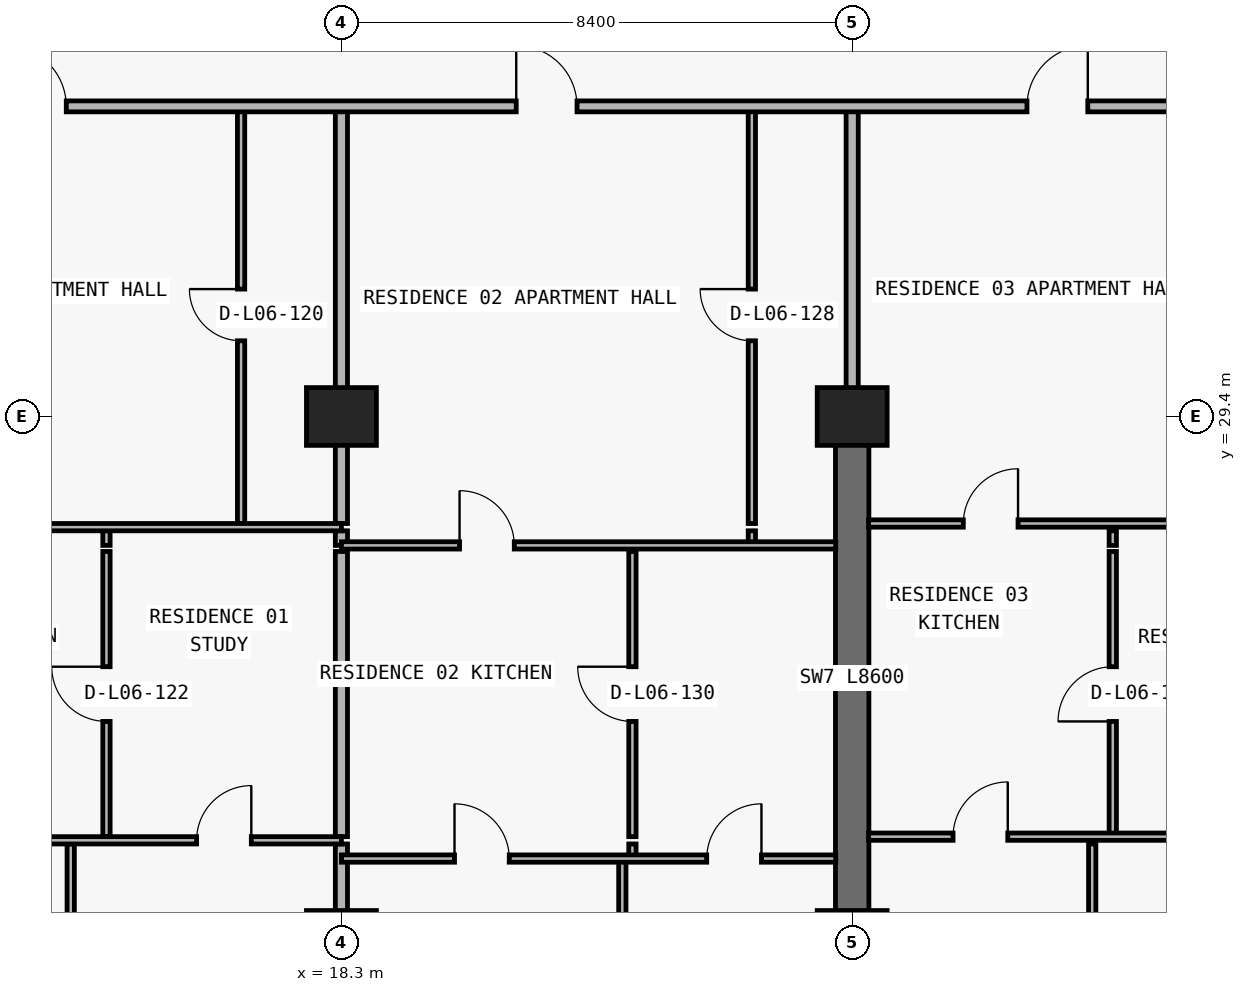
"""IFC4 building model, lengths in metres.
Left out: names, types, materials, properties, quantities, classifications, styles, units other than length and angle.
Written with IfcOpenShell. Run it as: python <this file> out.ifc"""

import sys

from ifc_helpers import new_model, si_unit, direction, frame, frame_2d, origin, origin_2d, place, context, subcontext, project, spatial, rectangle, extrude, element, fill, save


model = new_model("IFC4")
c1 = context("Model", 3, precision=1e-05, world=origin(), true_north=direction((0.0, 1.0)))
c2 = subcontext(c1, "Body", "Model", "MODEL_VIEW")
j1 = project(units=[si_unit("LENGTHUNIT", "METRE"), si_unit("PLANEANGLEUNIT", "RADIAN")], contexts=[c1])
p1 = place(None, origin())
s1 = spatial("IfcSite", under=j1, at=p1, CompositionType="ELEMENT")
p2 = place(p1, origin())
s2 = spatial("IfcBuilding", under=s1, at=p2, CompositionType="ELEMENT")
p3 = place(p2, frame((0.0, 0.0, 30.0)))
s3 = spatial("IfcBuildingStorey", under=s2, at=p3, CompositionType="ELEMENT", Elevation=30.0)
for number, where, z_axis, x_axis in (
    (1, (18.3, 20.8, 0.0), (0.0, 0.0, 1.0), (1.0, 0.0, 0.0)),
    (2, (26.7, 20.8, 0.0), (0.0, 0.0, 1.0), (1.0, 0.0, 0.0)),
    (3, (18.3, 29.4, 0.0), (0.0, 0.0, 1.0), (1.0, 0.0, 0.0)),
    (4, (26.7, 29.4, 0.0), (0.0, 0.0, 1.0), (1.0, 0.0, 0.0)),
):
    element("IfcColumn", number, at=place(p3, frame(where, z_axis=z_axis, x_axis=x_axis)), inside=s3, PredefinedType="COLUMN", context=c2, shape_type="SweptSolid", body=[
        extrude(rectangle(XDim=1.15, YDim=0.95, at=origin_2d()), origin(), (0.0, 0.0, 1.0), 3.05),
    ])
p4 = place(p3, frame((26.7, 20.8, 0.0), z_axis=(0.0, 0.0, 1.0), x_axis=(0.0, 1.0, 0.0)))
e5 = element("IfcWall", 5, at=p4, inside=s3, PredefinedType="SHEAR", context=c2, shape_type="SweptSolid", body=[
    extrude(rectangle(XDim=8.6, YDim=0.55, at=frame_2d((4.3, 0.0))), origin(), (0.0, 0.0, 1.0), 3.05),
])
p5 = place(p3, frame((13.848, 6.24, 0.0), z_axis=(0.0, 0.0, 1.0), x_axis=(0.0, 1.0, 0.0)))
e6 = element("IfcWall", 6, at=p5, inside=s3, PredefinedType="PARTITIONING", context=c2, shape_type="SweptSolid", body=[
    extrude(rectangle(XDim=16.13, YDim=0.12, at=frame_2d((8.065, 0.0))), origin(), (0.0, 0.0, 1.0), 3.05),
])
p6 = place(p3, frame((14.436, 22.49, 0.0), z_axis=(0.0, 0.0, 1.0), x_axis=(0.0, 1.0, 0.0)))
e7 = element("IfcWall", 7, at=p6, inside=s3, PredefinedType="PARTITIONING", context=c2, shape_type="SweptSolid", body=[
    extrude(rectangle(XDim=4.69, YDim=0.12, at=frame_2d((2.345, 0.0))), origin(), (0.0, 0.0, 1.0), 3.05),
])
p7 = place(p6, frame((1.895, 0.0, 0.0)))
e8 = element("IfcOpeningElement", 8, at=p7, cuts=e7, PredefinedType="OPENING", context=c2, shape_type="SweptSolid", body=[
    extrude(rectangle(XDim=0.9, YDim=2.15, at=frame_2d((0.45, 1.075))), frame((0.0, 0.07, 0.0), z_axis=(0.0, -1.0, 0.0), x_axis=(1.0, 0.0, 0.0)), (0.0, 0.0, 1.0), 0.14),
])
p8 = place(p3, frame((14.436, 27.28, 0.0), z_axis=(0.0, 0.0, 1.0), x_axis=(0.0, 1.0, 0.0)))
e9 = element("IfcWall", 9, at=p8, inside=s3, PredefinedType="PARTITIONING", context=c2, shape_type="SweptSolid", body=[
    extrude(rectangle(XDim=0.24, YDim=0.12, at=frame_2d((0.12, 0.0))), origin(), (0.0, 0.0, 1.0), 3.05),
])
p9 = place(p3, frame((16.65, 27.64, 0.0), z_axis=(0.0, 0.0, 1.0), x_axis=(0.0, 1.0, 0.0)))
e10 = element("IfcWall", 10, at=p9, inside=s3, PredefinedType="PARTITIONING", context=c2, shape_type="SweptSolid", body=[
    extrude(rectangle(XDim=6.86, YDim=0.12, at=frame_2d((3.43, 0.0))), origin(), (0.0, 0.0, 1.0), 3.05),
])
p10 = place(p9, frame((3.005, 0.0, 0.0)))
e11 = element("IfcOpeningElement", 11, at=p10, cuts=e10, PredefinedType="OPENING", context=c2, shape_type="SweptSolid", body=[
    extrude(rectangle(XDim=0.85, YDim=2.1, at=frame_2d((0.425, 1.05))), frame((0.0, 0.07, 0.0), z_axis=(0.0, -1.0, 0.0), x_axis=(1.0, 0.0, 0.0)), (0.0, 0.0, 1.0), 0.14),
])
p11 = place(p3, frame((18.3, 6.24, 0.0), z_axis=(0.0, 0.0, 1.0), x_axis=(0.0, 1.0, 0.0)))
e12 = element("IfcWall", 12, at=p11, inside=s3, PredefinedType="PARTITIONING", context=c2, shape_type="SweptSolid", body=[
    extrude(rectangle(XDim=16.13, YDim=0.2, at=frame_2d((8.065, 0.0))), origin(), (0.0, 0.0, 1.0), 2.11),
])
p12 = place(p3, frame((18.3, 22.49, 0.0), z_axis=(0.0, 0.0, 1.0), x_axis=(0.0, 1.0, 0.0)))
e13 = element("IfcWall", 13, at=p12, inside=s3, PredefinedType="PARTITIONING", context=c2, shape_type="SweptSolid", body=[
    extrude(rectangle(XDim=4.69, YDim=0.2, at=frame_2d((2.345, 0.0))), origin(), (0.0, 0.0, 1.0), 2.11),
])
p13 = place(p3, frame((18.3, 27.28, 0.0), z_axis=(0.0, 0.0, 1.0), x_axis=(0.0, 1.0, 0.0)))
e14 = element("IfcWall", 14, at=p13, inside=s3, PredefinedType="PARTITIONING", context=c2, shape_type="SweptSolid", body=[
    extrude(rectangle(XDim=0.24, YDim=0.2, at=frame_2d((0.12, 0.0))), origin(), (0.0, 0.0, 1.0), 2.11),
])
p14 = place(p3, frame((18.3, 27.64, 0.0), z_axis=(0.0, 0.0, 1.0), x_axis=(0.0, 1.0, 0.0)))
e15 = element("IfcWall", 15, at=p14, inside=s3, PredefinedType="PARTITIONING", context=c2, shape_type="SweptSolid", body=[
    extrude(rectangle(XDim=6.86, YDim=0.2, at=frame_2d((3.43, 0.0))), origin(), (0.0, 0.0, 1.0), 2.11),
])
p15 = place(p3, frame((22.92, 6.24, 0.0), z_axis=(0.0, 0.0, 1.0), x_axis=(0.0, 1.0, 0.0)))
e16 = element("IfcWall", 16, at=p15, inside=s3, PredefinedType="PARTITIONING", context=c2, shape_type="SweptSolid", body=[
    extrude(rectangle(XDim=15.89, YDim=0.12, at=frame_2d((7.945, 0.0))), origin(), (0.0, 0.0, 1.0), 3.05),
])
p16 = place(p3, frame((23.086, 22.135, 0.0), z_axis=(0.0, 0.0, 1.0), x_axis=(0.0, 1.0, 0.0)))
e17 = element("IfcWall", 17, at=p16, inside=s3, PredefinedType="PARTITIONING", context=c2, shape_type="SweptSolid", body=[
    extrude(rectangle(XDim=0.235, YDim=0.12, at=frame_2d((0.118, 0.0))), origin(), (0.0, 0.0, 1.0), 3.05),
])
p17 = place(p3, frame((23.086, 22.49, 0.0), z_axis=(0.0, 0.0, 1.0), x_axis=(0.0, 1.0, 0.0)))
e18 = element("IfcWall", 18, at=p17, inside=s3, PredefinedType="PARTITIONING", context=c2, shape_type="SweptSolid", body=[
    extrude(rectangle(XDim=4.69, YDim=0.12, at=frame_2d((2.345, 0.0))), origin(), (0.0, 0.0, 1.0), 3.05),
])
p18 = place(p17, frame((1.895, 0.0, 0.0)))
e19 = element("IfcOpeningElement", 19, at=p18, cuts=e18, PredefinedType="OPENING", context=c2, shape_type="SweptSolid", body=[
    extrude(rectangle(XDim=0.9, YDim=2.15, at=frame_2d((0.45, 1.075))), frame((0.0, 0.07, 0.0), z_axis=(0.0, -1.0, 0.0), x_axis=(1.0, 0.0, 0.0)), (0.0, 0.0, 1.0), 0.14),
])
p19 = place(p3, frame((25.05, 27.28, 0.0), z_axis=(0.0, 0.0, 1.0), x_axis=(0.0, 1.0, 0.0)))
e20 = element("IfcWall", 20, at=p19, inside=s3, PredefinedType="PARTITIONING", context=c2, shape_type="SweptSolid", body=[
    extrude(rectangle(XDim=0.24, YDim=0.12, at=frame_2d((0.12, 0.0))), origin(), (0.0, 0.0, 1.0), 3.05),
])
p20 = place(p3, frame((25.05, 27.64, 0.0), z_axis=(0.0, 0.0, 1.0), x_axis=(0.0, 1.0, 0.0)))
e21 = element("IfcWall", 21, at=p20, inside=s3, PredefinedType="PARTITIONING", context=c2, shape_type="SweptSolid", body=[
    extrude(rectangle(XDim=6.86, YDim=0.12, at=frame_2d((3.43, 0.0))), origin(), (0.0, 0.0, 1.0), 3.05),
])
p21 = place(p20, frame((3.005, 0.0, 0.0)))
e22 = element("IfcOpeningElement", 22, at=p21, cuts=e21, PredefinedType="OPENING", context=c2, shape_type="SweptSolid", body=[
    extrude(rectangle(XDim=0.85, YDim=2.1, at=frame_2d((0.425, 1.05))), frame((0.0, 0.07, 0.0), z_axis=(0.0, -1.0, 0.0), x_axis=(1.0, 0.0, 0.0)), (0.0, 0.0, 1.0), 0.14),
])
p22 = place(p3, frame((26.7, 29.405, 0.0), z_axis=(0.0, 0.0, 1.0), x_axis=(0.0, 1.0, 0.0)))
e23 = element("IfcWall", 23, at=p22, inside=s3, PredefinedType="PARTITIONING", context=c2, shape_type="SweptSolid", body=[
    extrude(rectangle(XDim=5.095, YDim=0.2, at=frame_2d((2.547, 0.0))), origin(), (0.0, 0.0, 1.0), 2.335),
])
p23 = place(p3, frame((30.648, 6.24, 0.0), z_axis=(0.0, 0.0, 1.0), x_axis=(0.0, 1.0, 0.0)))
e24 = element("IfcWall", 24, at=p23, inside=s3, PredefinedType="PARTITIONING", context=c2, shape_type="SweptSolid", body=[
    extrude(rectangle(XDim=16.13, YDim=0.12, at=frame_2d((8.065, 0.0))), origin(), (0.0, 0.0, 1.0), 3.05),
])
p24 = place(p3, frame((30.986, 22.49, 0.0), z_axis=(0.0, 0.0, 1.0), x_axis=(0.0, 1.0, 0.0)))
e25 = element("IfcWall", 25, at=p24, inside=s3, PredefinedType="PARTITIONING", context=c2, shape_type="SweptSolid", body=[
    extrude(rectangle(XDim=4.69, YDim=0.12, at=frame_2d((2.345, 0.0))), origin(), (0.0, 0.0, 1.0), 3.05),
])
p25 = place(p24, frame((1.895, 0.0, 0.0)))
e26 = element("IfcOpeningElement", 26, at=p25, cuts=e25, PredefinedType="OPENING", context=c2, shape_type="SweptSolid", body=[
    extrude(rectangle(XDim=0.9, YDim=2.15, at=frame_2d((0.45, 1.075))), frame((0.0, 0.07, 0.0), z_axis=(0.0, -1.0, 0.0), x_axis=(1.0, 0.0, 0.0)), (0.0, 0.0, 1.0), 0.14),
])
p26 = place(p3, frame((30.986, 27.28, 0.0), z_axis=(0.0, 0.0, 1.0), x_axis=(0.0, 1.0, 0.0)))
e27 = element("IfcWall", 27, at=p26, inside=s3, PredefinedType="PARTITIONING", context=c2, shape_type="SweptSolid", body=[
    extrude(rectangle(XDim=0.24, YDim=0.12, at=frame_2d((0.12, 0.0))), origin(), (0.0, 0.0, 1.0), 3.05),
])
p27 = place(p3, frame((18.3, 22.13, 0.0), z_axis=(0.0, 0.0, 1.0), x_axis=(1.0, 0.0, 0.0)))
e28 = element("IfcWall", 28, at=p27, inside=s3, PredefinedType="PARTITIONING", context=c2, shape_type="SweptSolid", body=[
    extrude(rectangle(XDim=8.13, YDim=0.12, at=frame_2d((4.065, 0.0))), origin(), (0.0, 0.0, 1.0), 3.05),
])
p28 = place(p27, frame((1.86, 0.0, 0.0)))
e29 = element("IfcOpeningElement", 29, at=p28, cuts=e28, PredefinedType="OPENING", context=c2, shape_type="SweptSolid", body=[
    extrude(rectangle(XDim=0.9, YDim=2.15, at=frame_2d((0.45, 1.075))), frame((0.0, 0.07, 0.0), z_axis=(0.0, -1.0, 0.0), x_axis=(1.0, 0.0, 0.0)), (0.0, 0.0, 1.0), 0.14),
])
p29 = place(p27, frame((6.008, 0.0, 0.0)))
e30 = element("IfcOpeningElement", 30, at=p29, cuts=e28, PredefinedType="OPENING", context=c2, shape_type="SweptSolid", body=[
    extrude(rectangle(XDim=0.9, YDim=2.15, at=frame_2d((0.45, 1.075))), frame((0.0, 0.07, 0.0), z_axis=(0.0, -1.0, 0.0), x_axis=(1.0, 0.0, 0.0)), (0.0, 0.0, 1.0), 0.14),
])
p30 = place(p3, frame((9.9, 22.43, 0.0), z_axis=(0.0, 0.0, 1.0), x_axis=(1.0, 0.0, 0.0)))
e31 = element("IfcWall", 31, at=p30, inside=s3, PredefinedType="PARTITIONING", context=c2, shape_type="SweptSolid", body=[
    extrude(rectangle(XDim=8.4, YDim=0.12, at=frame_2d((4.2, 0.0))), origin(), (0.0, 0.0, 1.0), 3.05),
])
p31 = place(p30, frame((1.524, 0.0, 0.0)))
e32 = element("IfcOpeningElement", 32, at=p31, cuts=e31, PredefinedType="OPENING", context=c2, shape_type="SweptSolid", body=[
    extrude(rectangle(XDim=0.9, YDim=2.15, at=frame_2d((0.45, 1.075))), frame((0.0, 0.07, 0.0), z_axis=(0.0, -1.0, 0.0), x_axis=(1.0, 0.0, 0.0)), (0.0, 0.0, 1.0), 0.14),
])
p32 = place(p30, frame((6.018, 0.0, 0.0)))
e33 = element("IfcOpeningElement", 33, at=p32, cuts=e31, PredefinedType="OPENING", context=c2, shape_type="SweptSolid", body=[
    extrude(rectangle(XDim=0.9, YDim=2.15, at=frame_2d((0.45, 1.075))), frame((0.0, 0.07, 0.0), z_axis=(0.0, -1.0, 0.0), x_axis=(1.0, 0.0, 0.0)), (0.0, 0.0, 1.0), 0.14),
])
p33 = place(p3, frame((26.97, 22.49, 0.0), z_axis=(0.0, 0.0, 1.0), x_axis=(1.0, 0.0, 0.0)))
e34 = element("IfcWall", 34, at=p33, inside=s3, PredefinedType="PARTITIONING", context=c2, shape_type="SweptSolid", body=[
    extrude(rectangle(XDim=8.125, YDim=0.12, at=frame_2d((4.062, 0.0))), origin(), (0.0, 0.0, 1.0), 3.05),
])
p34 = place(p33, frame((1.389, 0.0, 0.0)))
e35 = element("IfcOpeningElement", 35, at=p34, cuts=e34, PredefinedType="OPENING", context=c2, shape_type="SweptSolid", body=[
    extrude(rectangle(XDim=0.9, YDim=2.15, at=frame_2d((0.45, 1.075))), frame((0.0, 0.07, 0.0), z_axis=(0.0, -1.0, 0.0), x_axis=(1.0, 0.0, 0.0)), (0.0, 0.0, 1.0), 0.14),
])
p35 = place(p33, frame((5.621, 0.0, 0.0)))
e36 = element("IfcOpeningElement", 36, at=p35, cuts=e34, PredefinedType="OPENING", context=c2, shape_type="SweptSolid", body=[
    extrude(rectangle(XDim=0.9, YDim=2.15, at=frame_2d((0.45, 1.075))), frame((0.0, 0.07, 0.0), z_axis=(0.0, -1.0, 0.0), x_axis=(1.0, 0.0, 0.0)), (0.0, 0.0, 1.0), 0.14),
])
p36 = place(p3, frame((18.3, 27.28, 0.0), z_axis=(0.0, 0.0, 1.0), x_axis=(1.0, 0.0, 0.0)))
e37 = element("IfcWall", 37, at=p36, inside=s3, PredefinedType="PARTITIONING", context=c2, shape_type="SweptSolid", body=[
    extrude(rectangle(XDim=8.13, YDim=0.12, at=frame_2d((4.065, 0.0))), origin(), (0.0, 0.0, 1.0), 3.05),
])
p37 = place(p36, frame((1.943, 0.0, 0.0)))
e38 = element("IfcOpeningElement", 38, at=p37, cuts=e37, PredefinedType="OPENING", context=c2, shape_type="SweptSolid", body=[
    extrude(rectangle(XDim=0.9, YDim=2.15, at=frame_2d((0.45, 1.075))), frame((0.0, 0.07, 0.0), z_axis=(0.0, -1.0, 0.0), x_axis=(1.0, 0.0, 0.0)), (0.0, 0.0, 1.0), 0.14),
])
p38 = place(p3, frame((9.9, 27.58, 0.0), z_axis=(0.0, 0.0, 1.0), x_axis=(1.0, 0.0, 0.0)))
e39 = element("IfcWall", 39, at=p38, inside=s3, PredefinedType="PARTITIONING", context=c2, shape_type="SweptSolid", body=[
    extrude(rectangle(XDim=8.4, YDim=0.12, at=frame_2d((4.2, 0.0))), origin(), (0.0, 0.0, 1.0), 3.05),
])
p39 = place(p38, frame((1.818, 0.0, 0.0)))
e40 = element("IfcOpeningElement", 40, at=p39, cuts=e39, PredefinedType="OPENING", context=c2, shape_type="SweptSolid", body=[
    extrude(rectangle(XDim=0.9, YDim=2.15, at=frame_2d((0.45, 1.075))), frame((0.0, 0.07, 0.0), z_axis=(0.0, -1.0, 0.0), x_axis=(1.0, 0.0, 0.0)), (0.0, 0.0, 1.0), 0.14),
])
p40 = place(p3, frame((26.97, 27.64, 0.0), z_axis=(0.0, 0.0, 1.0), x_axis=(1.0, 0.0, 0.0)))
e41 = element("IfcWall", 41, at=p40, inside=s3, PredefinedType="PARTITIONING", context=c2, shape_type="SweptSolid", body=[
    extrude(rectangle(XDim=8.13, YDim=0.12, at=frame_2d((4.065, 0.0))), origin(), (0.0, 0.0, 1.0), 3.05),
])
p41 = place(p40, frame((1.558, 0.0, 0.0)))
e42 = element("IfcOpeningElement", 42, at=p41, cuts=e41, PredefinedType="OPENING", context=c2, shape_type="SweptSolid", body=[
    extrude(rectangle(XDim=0.9, YDim=2.15, at=frame_2d((0.45, 1.075))), frame((0.0, 0.07, 0.0), z_axis=(0.0, -1.0, 0.0), x_axis=(1.0, 0.0, 0.0)), (0.0, 0.0, 1.0), 0.14),
])
p42 = place(p3, frame((5.105, 34.5, 0.0), z_axis=(0.0, 0.0, 1.0), x_axis=(1.0, 0.0, 0.0)))
e43 = element("IfcWall", 43, at=p42, inside=s3, PredefinedType="PARTITIONING", context=c2, shape_type="SweptSolid", body=[
    extrude(rectangle(XDim=50.781, YDim=0.18, at=frame_2d((25.391, 0.0))), origin(), (0.0, 0.0, 1.0), 3.05),
])
p43 = place(p42, frame((7.67, 0.0, 0.0)))
e44 = element("IfcOpeningElement", 44, at=p43, cuts=e43, PredefinedType="OPENING", context=c2, shape_type="SweptSolid", body=[
    extrude(rectangle(XDim=1.0, YDim=2.2, at=frame_2d((0.5, 1.1))), frame((0.0, 0.1, 0.0), z_axis=(0.0, -1.0, 0.0), x_axis=(1.0, 0.0, 0.0)), (0.0, 0.0, 1.0), 0.2),
])
p44 = place(p42, frame((16.07, 0.0, 0.0)))
e45 = element("IfcOpeningElement", 45, at=p44, cuts=e43, PredefinedType="OPENING", context=c2, shape_type="SweptSolid", body=[
    extrude(rectangle(XDim=1.0, YDim=2.2, at=frame_2d((0.5, 1.1))), frame((0.0, 0.1, 0.0), z_axis=(0.0, -1.0, 0.0), x_axis=(1.0, 0.0, 0.0)), (0.0, 0.0, 1.0), 0.2),
])
p45 = place(p42, frame((24.47, 0.0, 0.0)))
e46 = element("IfcOpeningElement", 46, at=p45, cuts=e43, PredefinedType="OPENING", context=c2, shape_type="SweptSolid", body=[
    extrude(rectangle(XDim=1.0, YDim=2.2, at=frame_2d((0.5, 1.1))), frame((0.0, 0.1, 0.0), z_axis=(0.0, -1.0, 0.0), x_axis=(1.0, 0.0, 0.0)), (0.0, 0.0, 1.0), 0.2),
])
p46 = place(p42, frame((32.545, 0.0, 0.0)))
e47 = element("IfcOpeningElement", 47, at=p46, cuts=e43, PredefinedType="OPENING", context=c2, shape_type="SweptSolid", body=[
    extrude(rectangle(XDim=1.0, YDim=2.2, at=frame_2d((0.5, 1.1))), frame((0.0, 0.1, 0.0), z_axis=(0.0, -1.0, 0.0), x_axis=(1.0, 0.0, 0.0)), (0.0, 0.0, 1.0), 0.2),
])
p47 = place(p42, frame((47.888, 0.0, 0.0)))
e48 = element("IfcOpeningElement", 48, at=p47, cuts=e43, PredefinedType="OPENING", context=c2, shape_type="SweptSolid", body=[
    extrude(rectangle(XDim=1.0, YDim=2.2, at=frame_2d((0.5, 1.1))), frame((0.0, 0.1, 0.0), z_axis=(0.0, -1.0, 0.0), x_axis=(1.0, 0.0, 0.0)), (0.0, 0.0, 1.0), 0.2),
])
p48 = place(p43, origin())
e49 = element("IfcDoor", 49, at=p48, inside=s3, OperationType="SINGLE_SWING_LEFT", PredefinedType="DOOR", context=c2, shape_type="SweptSolid", body=[
    extrude(rectangle(XDim=1.0, YDim=2.2, at=frame_2d((0.5, 1.1))), frame((0.0, 0.025, 0.0), z_axis=(0.0, -1.0, 0.0), x_axis=(1.0, 0.0, 0.0)), (0.0, 0.0, 1.0), 0.05),
])
fill(e44, e49)
p49 = place(p10, origin())
e50 = element("IfcDoor", 50, at=p49, inside=s3, OperationType="SINGLE_SWING_RIGHT", PredefinedType="DOOR", context=c2, shape_type="SweptSolid", body=[
    extrude(rectangle(XDim=0.85, YDim=2.1, at=frame_2d((0.425, 1.05))), frame((0.0, 0.025, 0.0), z_axis=(0.0, -1.0, 0.0), x_axis=(1.0, 0.0, 0.0)), (0.0, 0.0, 1.0), 0.05),
])
fill(e11, e50)
p50 = place(p7, origin())
e51 = element("IfcDoor", 51, at=p50, inside=s3, OperationType="SINGLE_SWING_RIGHT", PredefinedType="DOOR", context=c2, shape_type="SweptSolid", body=[
    extrude(rectangle(XDim=0.9, YDim=2.15, at=frame_2d((0.45, 1.075))), frame((0.0, 0.025, 0.0), z_axis=(0.0, -1.0, 0.0), x_axis=(1.0, 0.0, 0.0)), (0.0, 0.0, 1.0), 0.05),
])
fill(e8, e51)
p51 = place(p32, origin())
e52 = element("IfcDoor", 52, at=p51, inside=s3, OperationType="SINGLE_SWING_RIGHT", PredefinedType="DOOR", context=c2, shape_type="SweptSolid", body=[
    extrude(rectangle(XDim=0.9, YDim=2.15, at=frame_2d((0.45, 1.075))), frame((0.0, 0.025, 0.0), z_axis=(0.0, -1.0, 0.0), x_axis=(1.0, 0.0, 0.0)), (0.0, 0.0, 1.0), 0.05),
])
fill(e33, e52)
p52 = place(p44, origin())
e53 = element("IfcDoor", 53, at=p52, inside=s3, OperationType="SINGLE_SWING_LEFT", PredefinedType="DOOR", context=c2, shape_type="SweptSolid", body=[
    extrude(rectangle(XDim=1.0, YDim=2.2, at=frame_2d((0.5, 1.1))), frame((0.0, 0.025, 0.0), z_axis=(0.0, -1.0, 0.0), x_axis=(1.0, 0.0, 0.0)), (0.0, 0.0, 1.0), 0.05),
])
fill(e45, e53)
p53 = place(p21, origin())
e54 = element("IfcDoor", 54, at=p53, inside=s3, OperationType="SINGLE_SWING_RIGHT", PredefinedType="DOOR", context=c2, shape_type="SweptSolid", body=[
    extrude(rectangle(XDim=0.85, YDim=2.1, at=frame_2d((0.425, 1.05))), frame((0.0, 0.025, 0.0), z_axis=(0.0, -1.0, 0.0), x_axis=(1.0, 0.0, 0.0)), (0.0, 0.0, 1.0), 0.05),
])
fill(e22, e54)
p54 = place(p37, origin())
e55 = element("IfcDoor", 55, at=p54, inside=s3, OperationType="SINGLE_SWING_LEFT", PredefinedType="DOOR", context=c2, shape_type="SweptSolid", body=[
    extrude(rectangle(XDim=0.9, YDim=2.15, at=frame_2d((0.45, 1.075))), frame((0.0, 0.025, 0.0), z_axis=(0.0, -1.0, 0.0), x_axis=(1.0, 0.0, 0.0)), (0.0, 0.0, 1.0), 0.05),
])
fill(e38, e55)
p55 = place(p18, origin())
e56 = element("IfcDoor", 56, at=p55, inside=s3, OperationType="SINGLE_SWING_RIGHT", PredefinedType="DOOR", context=c2, shape_type="SweptSolid", body=[
    extrude(rectangle(XDim=0.9, YDim=2.15, at=frame_2d((0.45, 1.075))), frame((0.0, 0.025, 0.0), z_axis=(0.0, -1.0, 0.0), x_axis=(1.0, 0.0, 0.0)), (0.0, 0.0, 1.0), 0.05),
])
fill(e19, e56)
p56 = place(p28, origin())
e57 = element("IfcDoor", 57, at=p56, inside=s3, OperationType="SINGLE_SWING_LEFT", PredefinedType="DOOR", context=c2, shape_type="SweptSolid", body=[
    extrude(rectangle(XDim=0.9, YDim=2.15, at=frame_2d((0.45, 1.075))), frame((0.0, 0.025, 0.0), z_axis=(0.0, -1.0, 0.0), x_axis=(1.0, 0.0, 0.0)), (0.0, 0.0, 1.0), 0.05),
])
fill(e29, e57)
p57 = place(p29, origin())
e58 = element("IfcDoor", 58, at=p57, inside=s3, OperationType="SINGLE_SWING_RIGHT", PredefinedType="DOOR", context=c2, shape_type="SweptSolid", body=[
    extrude(rectangle(XDim=0.9, YDim=2.15, at=frame_2d((0.45, 1.075))), frame((0.0, 0.025, 0.0), z_axis=(0.0, -1.0, 0.0), x_axis=(1.0, 0.0, 0.0)), (0.0, 0.0, 1.0), 0.05),
])
fill(e30, e58)
p58 = place(p45, origin())
e59 = element("IfcDoor", 59, at=p58, inside=s3, OperationType="SINGLE_SWING_RIGHT", PredefinedType="DOOR", context=c2, shape_type="SweptSolid", body=[
    extrude(rectangle(XDim=1.0, YDim=2.2, at=frame_2d((0.5, 1.1))), frame((0.0, 0.025, 0.0), z_axis=(0.0, -1.0, 0.0), x_axis=(1.0, 0.0, 0.0)), (0.0, 0.0, 1.0), 0.05),
])
fill(e46, e59)
p59 = place(p41, origin())
e60 = element("IfcDoor", 60, at=p59, inside=s3, OperationType="SINGLE_SWING_RIGHT", PredefinedType="DOOR", context=c2, shape_type="SweptSolid", body=[
    extrude(rectangle(XDim=0.9, YDim=2.15, at=frame_2d((0.45, 1.075))), frame((0.0, 0.025, 0.0), z_axis=(0.0, -1.0, 0.0), x_axis=(1.0, 0.0, 0.0)), (0.0, 0.0, 1.0), 0.05),
])
fill(e42, e60)
p60 = place(p25, origin())
e61 = element("IfcDoor", 61, at=p60, inside=s3, OperationType="SINGLE_SWING_LEFT", PredefinedType="DOOR", context=c2, shape_type="SweptSolid", body=[
    extrude(rectangle(XDim=0.9, YDim=2.15, at=frame_2d((0.45, 1.075))), frame((0.0, 0.025, 0.0), z_axis=(0.0, -1.0, 0.0), x_axis=(1.0, 0.0, 0.0)), (0.0, 0.0, 1.0), 0.05),
])
fill(e26, e61)
p61 = place(p34, origin())
e62 = element("IfcDoor", 62, at=p61, inside=s3, OperationType="SINGLE_SWING_RIGHT", PredefinedType="DOOR", context=c2, shape_type="SweptSolid", body=[
    extrude(rectangle(XDim=0.9, YDim=2.15, at=frame_2d((0.45, 1.075))), frame((0.0, 0.025, 0.0), z_axis=(0.0, -1.0, 0.0), x_axis=(1.0, 0.0, 0.0)), (0.0, 0.0, 1.0), 0.05),
])
fill(e35, e62)
save(model, sys.argv[1])
